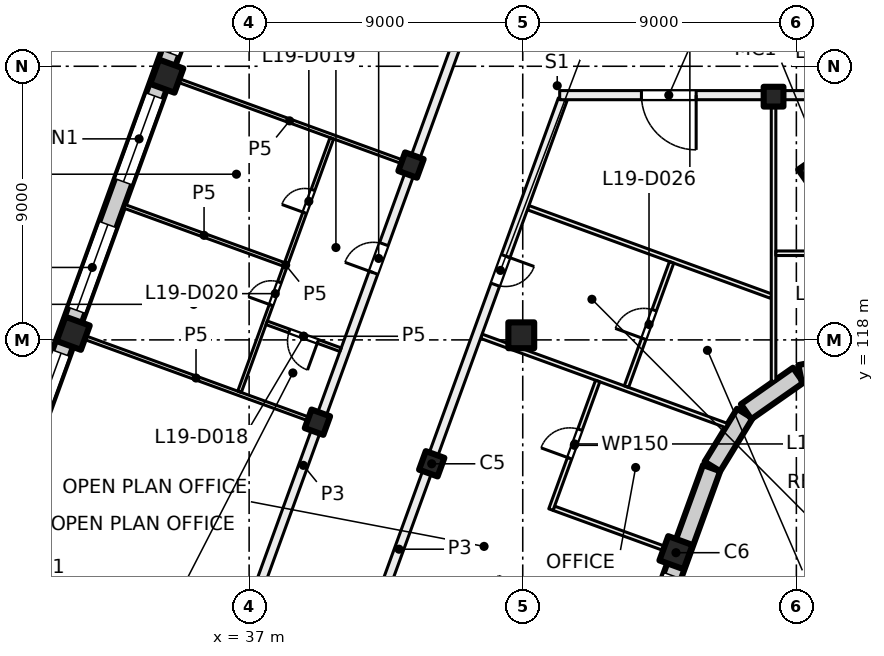
"""IFC4 building model, lengths in metres.
Left out: names, types, materials, properties, quantities, classifications, styles, units other than length and angle.
Written with IfcOpenShell. Run it as: python <this file> out.ifc"""

import sys

from ifc_helpers import new_model, si_unit, direction, frame, frame_2d, origin, origin_2d, place, context, subcontext, project, spatial, rectangle, hollow_rectangle, extrude, element, fill, save


model = new_model("IFC4")
c1 = context("Model", 3, precision=1e-05, world=origin(), true_north=direction((0.0, 1.0)))
c2 = subcontext(c1, "Body", "Model", "MODEL_VIEW")
j1 = project(units=[si_unit("LENGTHUNIT", "METRE"), si_unit("PLANEANGLEUNIT", "RADIAN")], contexts=[c1])
p1 = place(None, origin())
s1 = spatial("IfcSite", under=j1, at=p1, CompositionType="ELEMENT")
p2 = place(p1, origin())
s2 = spatial("IfcBuilding", under=s1, at=p2, CompositionType="ELEMENT")
p3 = place(p2, frame((0.0, 0.0, 85.0)))
s3 = spatial("IfcBuildingStorey", under=s2, at=p3, CompositionType="ELEMENT", Elevation=85.0)
p4 = place(p3, frame((56.036, 123.43, 0.0), z_axis=(0.0, 0.0, 1.0), x_axis=(0.573576436351, -0.819152044289, 0.0)))
e1 = element("IfcColumn", 1, at=p4, inside=s3, PredefinedType="COLUMN", context=c2, shape_type="SweptSolid", body=[
    extrude(hollow_rectangle(XDim=1.4, YDim=1.4, WallThickness=0.04, at=origin_2d()), origin(), (0.0, 0.0, 1.0), 4.0),
])
p5 = place(p3, frame((54.25, 126.0, 0.0), z_axis=(0.0, 0.0, 1.0), x_axis=(1.0, 0.0, 0.0)))
e2 = element("IfcColumn", 2, at=p5, inside=s3, PredefinedType="COLUMN", context=c2, shape_type="SweptSolid", body=[
    extrude(rectangle(XDim=0.65, YDim=0.65, at=origin_2d()), origin(), (0.0, 0.0, 1.0), 4.0),
])
p6 = place(p3, frame((45.952, 118.152, 0.0), z_axis=(0.0, 0.0, 1.0), x_axis=(1.0, 0.0, 0.0)))
e3 = element("IfcColumn", 3, at=p6, inside=s3, PredefinedType="COLUMN", context=c2, shape_type="SweptSolid", body=[
    extrude(rectangle(XDim=0.85, YDim=0.85, at=origin_2d()), origin(), (0.0, 0.0, 1.0), 4.0),
])
for number, where, z_axis, x_axis in (
    (4, (43.006, 113.925, 0.0), (0.0, 0.0, 1.0), (-0.342, -0.94, 0.0)),
    (5, (42.325, 123.751, 0.0), (0.0, 0.0, 1.0), (-0.342, -0.94, 0.0)),
    (6, (39.247, 115.293, 0.0), (0.0, 0.0, 1.0), (-0.342, -0.94, 0.0)),
):
    element("IfcColumn", number, at=place(p3, frame(where, z_axis=z_axis, x_axis=x_axis)), inside=s3, PredefinedType="COLUMN", context=c2, shape_type="SweptSolid", body=[
        extrude(rectangle(XDim=0.65, YDim=0.65, at=origin_2d()), origin(), (0.0, 0.0, 1.0), 4.0),
    ])
for number, where, z_axis, x_axis in (
    (7, (51.04, 111.001, 0.0), (0.0, 0.0, 1.0), (-0.342, -0.94, 0.0)),
    (8, (34.291, 126.675, 0.0), (0.0, 0.0, 1.0), (-0.342, -0.94, 0.0)),
    (9, (31.212, 118.218, 0.0), (0.0, 0.0, 1.0), (-0.342, -0.94, 0.0)),
):
    element("IfcColumn", number, at=place(p3, frame(where, z_axis=z_axis, x_axis=x_axis)), inside=s3, PredefinedType="COLUMN", context=c2, shape_type="SweptSolid", body=[
        extrude(rectangle(XDim=0.85, YDim=0.85, at=origin_2d()), origin(), (0.0, 0.0, 1.0), 4.0),
    ])
p7 = place(p3, frame((52.212, 113.783, 0.0), z_axis=(0.0, 0.0, 1.0), x_axis=(-0.34202521188, -0.939690775968, 0.0)))
e10 = element("IfcWall", 10, at=p7, inside=s3, PredefinedType="SOLIDWALL", context=c2, shape_type="SweptSolid", body=[
    extrude(rectangle(XDim=21.745, YDim=0.6, at=frame_2d((10.873, 0.0))), origin(), (0.0, 0.0, 1.0), 3.625),
])
p8 = place(p7, frame((3.765, 0.0, 0.9)))
e11 = element("IfcOpeningElement", 11, at=p8, cuts=e10, PredefinedType="OPENING", context=c2, shape_type="SweptSolid", body=[
    extrude(rectangle(XDim=3.0, YDim=2.4, at=frame_2d((1.5, 1.2))), frame((0.0, 0.31, 0.0), z_axis=(0.0, -1.0, 0.0), x_axis=(1.0, 0.0, 0.0)), (0.0, 0.0, 1.0), 0.62),
])
p9 = place(p7, frame((8.265, 0.0, 0.9)))
e12 = element("IfcOpeningElement", 12, at=p9, cuts=e10, PredefinedType="OPENING", context=c2, shape_type="SweptSolid", body=[
    extrude(rectangle(XDim=3.0, YDim=2.4, at=frame_2d((1.5, 1.2))), frame((0.0, 0.31, 0.0), z_axis=(0.0, -1.0, 0.0), x_axis=(1.0, 0.0, 0.0)), (0.0, 0.0, 1.0), 0.62),
])
p10 = place(p7, frame((12.765, 0.0, 0.9)))
e13 = element("IfcOpeningElement", 13, at=p10, cuts=e10, PredefinedType="OPENING", context=c2, shape_type="SweptSolid", body=[
    extrude(rectangle(XDim=3.0, YDim=2.4, at=frame_2d((1.5, 1.2))), frame((0.0, 0.31, 0.0), z_axis=(0.0, -1.0, 0.0), x_axis=(1.0, 0.0, 0.0)), (0.0, 0.0, 1.0), 0.62),
])
p11 = place(p7, frame((17.265, 0.0, 0.9)))
e14 = element("IfcOpeningElement", 14, at=p11, cuts=e10, PredefinedType="OPENING", context=c2, shape_type="SweptSolid", body=[
    extrude(rectangle(XDim=3.0, YDim=2.4, at=frame_2d((1.5, 1.2))), frame((0.0, 0.31, 0.0), z_axis=(0.0, -1.0, 0.0), x_axis=(1.0, 0.0, 0.0)), (0.0, 0.0, 1.0), 0.62),
])
p12 = place(p3, frame((53.305, 115.578, 0.0), z_axis=(0.0, 0.0, 1.0), x_axis=(-0.522402266438, -0.852699168535, 0.0)))
e15 = element("IfcWall", 15, at=p12, inside=s3, PredefinedType="SOLIDWALL", context=c2, shape_type="SweptSolid", body=[
    extrude(rectangle(XDim=2.042, YDim=0.6, at=frame_2d((1.021, 0.0))), origin(), (0.0, 0.0, 1.0), 3.625),
])
for number, where, z_axis, x_axis in (
    (16, (55.062, 116.839, 0.0), (0.0, 0.0, 1.0), (-0.819, -0.574, 0.0)),
    (17, (57.175, 117.294, 0.0), (0.0, 0.0, 1.0), (-0.98, -0.199, 0.0)),
):
    element("IfcWall", number, at=place(p3, frame(where, z_axis=z_axis, x_axis=x_axis)), inside=s3, PredefinedType="SOLIDWALL", context=c2, shape_type="SweptSolid", body=[
        extrude(rectangle(XDim=2.092, YDim=0.6, at=frame_2d((1.046, 0.0))), origin(), (0.0, 0.0, 1.0), 3.625),
    ])
p13 = place(p3, frame((24.666, 100.669, 0.0), z_axis=(0.0, 0.0, 1.0), x_axis=(0.34201964167, 0.939692803373, 0.0)))
e18 = element("IfcWall", 18, at=p13, inside=s3, PredefinedType="SOLIDWALL", context=c2, shape_type="SweptSolid", body=[
    extrude(rectangle(XDim=32.884, YDim=0.6, at=frame_2d((16.442, 0.0))), origin(), (0.0, 0.0, 1.0), 3.625),
])
p14 = place(p13, frame((1.48, 0.0, 0.9)))
e19 = element("IfcOpeningElement", 19, at=p14, cuts=e18, PredefinedType="OPENING", context=c2, shape_type="SweptSolid", body=[
    extrude(rectangle(XDim=3.0, YDim=2.4, at=frame_2d((1.5, 1.2))), frame((0.0, 0.31, 0.0), z_axis=(0.0, -1.0, 0.0), x_axis=(1.0, 0.0, 0.0)), (0.0, 0.0, 1.0), 0.62),
])
p15 = place(p13, frame((5.98, 0.0, 0.9)))
e20 = element("IfcOpeningElement", 20, at=p15, cuts=e18, PredefinedType="OPENING", context=c2, shape_type="SweptSolid", body=[
    extrude(rectangle(XDim=3.0, YDim=2.4, at=frame_2d((1.5, 1.2))), frame((0.0, 0.31, 0.0), z_axis=(0.0, -1.0, 0.0), x_axis=(1.0, 0.0, 0.0)), (0.0, 0.0, 1.0), 0.62),
])
p16 = place(p13, frame((10.48, 0.0, 0.9)))
e21 = element("IfcOpeningElement", 21, at=p16, cuts=e18, PredefinedType="OPENING", context=c2, shape_type="SweptSolid", body=[
    extrude(rectangle(XDim=3.0, YDim=2.4, at=frame_2d((1.5, 1.2))), frame((0.0, 0.31, 0.0), z_axis=(0.0, -1.0, 0.0), x_axis=(1.0, 0.0, 0.0)), (0.0, 0.0, 1.0), 0.62),
])
p17 = place(p13, frame((14.98, 0.0, 0.9)))
e22 = element("IfcOpeningElement", 22, at=p17, cuts=e18, PredefinedType="OPENING", context=c2, shape_type="SweptSolid", body=[
    extrude(rectangle(XDim=3.0, YDim=2.4, at=frame_2d((1.5, 1.2))), frame((0.0, 0.31, 0.0), z_axis=(0.0, -1.0, 0.0), x_axis=(1.0, 0.0, 0.0)), (0.0, 0.0, 1.0), 0.62),
])
p18 = place(p13, frame((19.48, 0.0, 0.9)))
e23 = element("IfcOpeningElement", 23, at=p18, cuts=e18, PredefinedType="OPENING", context=c2, shape_type="SweptSolid", body=[
    extrude(rectangle(XDim=3.0, YDim=2.4, at=frame_2d((1.5, 1.2))), frame((0.0, 0.31, 0.0), z_axis=(0.0, -1.0, 0.0), x_axis=(1.0, 0.0, 0.0)), (0.0, 0.0, 1.0), 0.62),
])
p19 = place(p13, frame((23.98, 0.0, 0.9)))
e24 = element("IfcOpeningElement", 24, at=p19, cuts=e18, PredefinedType="OPENING", context=c2, shape_type="SweptSolid", body=[
    extrude(rectangle(XDim=3.0, YDim=2.4, at=frame_2d((1.5, 1.2))), frame((0.0, 0.31, 0.0), z_axis=(0.0, -1.0, 0.0), x_axis=(1.0, 0.0, 0.0)), (0.0, 0.0, 1.0), 0.62),
])
p20 = place(p13, frame((28.48, 0.0, 0.9)))
e25 = element("IfcOpeningElement", 25, at=p20, cuts=e18, PredefinedType="OPENING", context=c2, shape_type="SweptSolid", body=[
    extrude(rectangle(XDim=3.0, YDim=2.4, at=frame_2d((1.5, 1.2))), frame((0.0, 0.31, 0.0), z_axis=(0.0, -1.0, 0.0), x_axis=(1.0, 0.0, 0.0)), (0.0, 0.0, 1.0), 0.62),
])
p21 = place(p3, frame((31.353, 118.166, 0.0), z_axis=(0.0, 0.0, 1.0), x_axis=(0.939687752599, -0.342033518263, 0.0)))
e26 = element("IfcWall", 26, at=p21, inside=s3, PredefinedType="PARTITIONING", context=c2, shape_type="SweptSolid", body=[
    extrude(rectangle(XDim=8.301, YDim=0.125, at=frame_2d((4.15, 0.0))), origin(), (0.0, 0.0, 1.0), 3.625),
])
p22 = place(p3, frame((32.881, 97.657, 0.0), z_axis=(0.0, 0.0, 1.0), x_axis=(0.342017360004, 0.939693633828, 0.0)))
e27 = element("IfcWall", 27, at=p22, inside=s3, PredefinedType="PARTITIONING", context=c2, shape_type="SweptSolid", body=[
    extrude(rectangle(XDim=34.516, YDim=0.3, at=frame_2d((17.258, 0.0))), origin(), (0.0, 0.0, 1.0), 3.625),
])
p23 = place(p22, frame((7.475, 0.0, 0.0)))
e28 = element("IfcOpeningElement", 28, at=p23, cuts=e27, PredefinedType="OPENING", context=c2, shape_type="SweptSolid", body=[
    extrude(rectangle(XDim=1.8, YDim=2.1, at=frame_2d((0.9, 1.05))), frame((0.0, 0.16, 0.0), z_axis=(0.0, -1.0, 0.0), x_axis=(1.0, 0.0, 0.0)), (0.0, 0.0, 1.0), 0.32),
])
p24 = place(p22, frame((24.0, 0.0, 0.0)))
e29 = element("IfcOpeningElement", 29, at=p24, cuts=e27, PredefinedType="OPENING", context=c2, shape_type="SweptSolid", body=[
    extrude(rectangle(XDim=1.0, YDim=2.1, at=frame_2d((0.5, 1.05))), frame((0.0, 0.16, 0.0), z_axis=(0.0, -1.0, 0.0), x_axis=(1.0, 0.0, 0.0)), (0.0, 0.0, 1.0), 0.32),
])
p25 = place(p3, frame((32.892, 122.395, 0.0), z_axis=(0.0, 0.0, 1.0), x_axis=(0.939696437289, -0.342009657388, 0.0)))
e30 = element("IfcWall", 30, at=p25, inside=s3, PredefinedType="PARTITIONING", context=c2, shape_type="SweptSolid", body=[
    extrude(rectangle(XDim=5.588, YDim=0.125, at=frame_2d((2.794, 0.0))), origin(), (0.0, 0.0, 1.0), 3.625),
])
p26 = place(p3, frame((34.431, 126.624, 0.0), z_axis=(0.0, 0.0, 1.0), x_axis=(0.939687752599, -0.342033518263, 0.0)))
e31 = element("IfcWall", 31, at=p26, inside=s3, PredefinedType="PARTITIONING", context=c2, shape_type="SweptSolid", body=[
    extrude(rectangle(XDim=8.301, YDim=0.125, at=frame_2d((4.15, 0.0))), origin(), (0.0, 0.0, 1.0), 3.625),
])
p27 = place(p3, frame((36.684, 116.293, 0.0), z_axis=(0.0, 0.0, 1.0), x_axis=(0.342089829483, 0.939667254173, 0.0)))
e32 = element("IfcWall", 32, at=p27, inside=s3, PredefinedType="PARTITIONING", context=c2, shape_type="SweptSolid", body=[
    extrude(rectangle(XDim=8.875, YDim=0.125, at=frame_2d((4.437, 0.0))), origin(), (0.0, 0.0, 1.0), 3.625),
])
p28 = place(p27, frame((6.266, 0.0, 0.0)))
e33 = element("IfcOpeningElement", 33, at=p28, cuts=e32, PredefinedType="OPENING", context=c2, shape_type="SweptSolid", body=[
    extrude(rectangle(XDim=0.8, YDim=2.1, at=frame_2d((0.4, 1.05))), frame((0.0, 0.073, 0.0), z_axis=(0.0, -1.0, 0.0), x_axis=(1.0, 0.0, 0.0)), (0.0, 0.0, 1.0), 0.145),
])
p29 = place(p27, frame((3.036, 0.0, 0.0)))
e34 = element("IfcOpeningElement", 34, at=p29, cuts=e32, PredefinedType="OPENING", context=c2, shape_type="SweptSolid", body=[
    extrude(rectangle(XDim=0.8, YDim=2.1, at=frame_2d((0.4, 1.05))), frame((0.0, 0.073, 0.0), z_axis=(0.0, -1.0, 0.0), x_axis=(1.0, 0.0, 0.0)), (0.0, 0.0, 1.0), 0.145),
])
p30 = place(p3, frame((40.008, 117.677, 0.0), z_axis=(0.0, 0.0, 1.0), x_axis=(-0.939674895655, 0.342068838798, 0.0)))
e35 = element("IfcWall", 35, at=p30, inside=s3, PredefinedType="PARTITIONING", context=c2, shape_type="SweptSolid", body=[
    extrude(rectangle(XDim=2.587, YDim=0.125, at=frame_2d((1.293, 0.0))), origin(), (0.0, 0.0, 1.0), 3.625),
])
p31 = place(p30, frame((0.793, 0.0, 0.0)))
e36 = element("IfcOpeningElement", 36, at=p31, cuts=e35, PredefinedType="OPENING", context=c2, shape_type="SweptSolid", body=[
    extrude(rectangle(XDim=1.0, YDim=2.1, at=frame_2d((0.5, 1.05))), frame((0.0, 0.073, 0.0), z_axis=(0.0, -1.0, 0.0), x_axis=(1.0, 0.0, 0.0)), (0.0, 0.0, 1.0), 0.145),
])
p32 = place(p3, frame((44.639, 118.12, 0.0), z_axis=(0.0, 0.0, 1.0), x_axis=(0.939669707102, -0.342083091593, 0.0)))
e37 = element("IfcWall", 37, at=p32, inside=s3, PredefinedType="PARTITIONING", context=c2, shape_type="SweptSolid", body=[
    extrude(rectangle(XDim=8.589, YDim=0.15, at=frame_2d((4.295, 0.0))), origin(), (0.0, 0.0, 1.0), 3.625),
])
p33 = place(p3, frame((46.178, 122.349, 0.0), z_axis=(0.0, 0.0, 1.0), x_axis=(0.939669476286, -0.342083725624, 0.0)))
e38 = element("IfcWall", 38, at=p33, inside=s3, PredefinedType="PARTITIONING", context=c2, shape_type="SweptSolid", body=[
    extrude(rectangle(XDim=8.516, YDim=0.15, at=frame_2d((4.258, 0.0))), origin(), (0.0, 0.0, 1.0), 3.625),
])
p34 = place(p3, frame((50.899, 111.052, 0.0), z_axis=(0.0, 0.0, 1.0), x_axis=(-0.93970873465, 0.341975867603, 0.0)))
e39 = element("IfcWall", 39, at=p34, inside=s3, PredefinedType="PARTITIONING", context=c2, shape_type="SweptSolid", body=[
    extrude(rectangle(XDim=4.126, YDim=0.15, at=frame_2d((2.063, 0.0))), origin(), (0.0, 0.0, 1.0), 3.625),
])
p35 = place(p3, frame((47.314, 125.909, 0.0), z_axis=(0.0, 0.0, 1.0), x_axis=(-0.342010770371, -0.939696032209, 0.0)))
e40 = element("IfcWall", 40, at=p35, inside=s3, PredefinedType="PARTITIONING", context=c2, shape_type="SweptSolid", body=[
    extrude(rectangle(XDim=31.485, YDim=0.3, at=frame_2d((15.742, 0.0))), origin(), (0.0, 0.0, 1.0), 3.625),
])
p36 = place(p35, frame((23.459, 0.0, 0.0)))
e41 = element("IfcOpeningElement", 41, at=p36, cuts=e40, PredefinedType="OPENING", context=c2, shape_type="SweptSolid", body=[
    extrude(rectangle(XDim=1.8, YDim=2.1, at=frame_2d((0.9, 1.05))), frame((0.0, 0.16, 0.0), z_axis=(0.0, -1.0, 0.0), x_axis=(1.0, 0.0, 0.0)), (0.0, 0.0, 1.0), 0.32),
])
p37 = place(p35, frame((5.484, 0.0, 0.0)))
e42 = element("IfcOpeningElement", 42, at=p37, cuts=e40, PredefinedType="OPENING", context=c2, shape_type="SweptSolid", body=[
    extrude(rectangle(XDim=1.0, YDim=2.1, at=frame_2d((0.5, 1.05))), frame((0.0, 0.16, 0.0), z_axis=(0.0, -1.0, 0.0), x_axis=(1.0, 0.0, 0.0)), (0.0, 0.0, 1.0), 0.32),
])
p38 = place(p3, frame((46.926, 112.419, 0.0), z_axis=(0.0, 0.0, 1.0), x_axis=(0.342056723843, 0.93967930576, 0.0)))
e43 = element("IfcWall", 43, at=p38, inside=s3, PredefinedType="PARTITIONING", context=c2, shape_type="SweptSolid", body=[
    extrude(rectangle(XDim=4.5, YDim=0.15, at=frame_2d((2.25, 0.0))), origin(), (0.0, 0.0, 1.0), 3.625),
])
p39 = place(p38, frame((1.797, 0.0, 0.0)))
e44 = element("IfcOpeningElement", 44, at=p39, cuts=e43, PredefinedType="OPENING", context=c2, shape_type="SweptSolid", body=[
    extrude(rectangle(XDim=1.0, YDim=2.1, at=frame_2d((0.5, 1.05))), frame((0.0, 0.085, 0.0), z_axis=(0.0, -1.0, 0.0), x_axis=(1.0, 0.0, 0.0)), (0.0, 0.0, 1.0), 0.17),
])
p40 = place(p3, frame((49.41, 116.463, 0.0), z_axis=(0.0, 0.0, 1.0), x_axis=(0.341837690029, 0.939759008297, 0.0)))
e45 = element("IfcWall", 45, at=p40, inside=s3, PredefinedType="PARTITIONING", context=c2, shape_type="SweptSolid", body=[
    extrude(rectangle(XDim=4.35, YDim=0.15, at=frame_2d((2.175, 0.0))), origin(), (0.0, 0.0, 1.0), 3.625),
])
p41 = place(p40, frame((1.675, 0.0, 0.0)))
e46 = element("IfcOpeningElement", 46, at=p41, cuts=e45, PredefinedType="OPENING", context=c2, shape_type="SweptSolid", body=[
    extrude(rectangle(XDim=1.0, YDim=2.1, at=frame_2d((0.5, 1.05))), frame((0.0, 0.085, 0.0), z_axis=(0.0, -1.0, 0.0), x_axis=(1.0, 0.0, 0.0)), (0.0, 0.0, 1.0), 0.17),
])
p42 = place(p3, frame((54.25, 116.637, 0.0), z_axis=(0.0, 0.0, 1.0), x_axis=(0.0, 1.0, 0.0)))
e47 = element("IfcWall", 47, at=p42, inside=s3, PredefinedType="PARTITIONING", context=c2, shape_type="SweptSolid", body=[
    extrude(rectangle(XDim=9.263, YDim=0.15, at=frame_2d((4.631, 0.0))), origin(), (0.0, 0.0, 1.0), 3.625),
])
p43 = place(p3, frame((54.325, 120.85, 0.0), z_axis=(0.0, 0.0, 1.0), x_axis=(1.0, 0.0, 0.0)))
e48 = element("IfcWall", 48, at=p43, inside=s3, PredefinedType="PARTITIONING", context=c2, shape_type="SweptSolid", body=[
    extrude(rectangle(XDim=4.35, YDim=0.15, at=frame_2d((2.175, 0.0))), origin(), (0.0, 0.0, 1.0), 3.625),
])
p44 = place(p43, frame((1.675, 0.0, 0.0)))
e49 = element("IfcOpeningElement", 49, at=p44, cuts=e48, PredefinedType="OPENING", context=c2, shape_type="SweptSolid", body=[
    extrude(rectangle(XDim=1.0, YDim=2.1, at=frame_2d((0.5, 1.05))), frame((0.0, 0.085, 0.0), z_axis=(0.0, -1.0, 0.0), x_axis=(1.0, 0.0, 0.0)), (0.0, 0.0, 1.0), 0.17),
])
p45 = place(p3, frame((91.0, 126.05, 0.0), z_axis=(0.0, 0.0, 1.0), x_axis=(-1.0, 0.0, 0.0)))
e50 = element("IfcWall", 50, at=p45, inside=s3, PredefinedType="PARTITIONING", context=c2, shape_type="SweptSolid", body=[
    extrude(rectangle(XDim=43.785, YDim=0.3, at=frame_2d((21.893, 0.0))), origin(), (0.0, 0.0, 1.0), 3.625),
])
p46 = place(p45, frame((7.475, 0.0, 0.0)))
e51 = element("IfcOpeningElement", 51, at=p46, cuts=e50, PredefinedType="OPENING", context=c2, shape_type="SweptSolid", body=[
    extrude(rectangle(XDim=1.8, YDim=2.1, at=frame_2d((0.9, 1.05))), frame((0.0, 0.16, 0.0), z_axis=(0.0, -1.0, 0.0), x_axis=(1.0, 0.0, 0.0)), (0.0, 0.0, 1.0), 0.32),
])
p47 = place(p45, frame((34.0, 0.0, 0.0)))
e52 = element("IfcOpeningElement", 52, at=p47, cuts=e50, PredefinedType="OPENING", context=c2, shape_type="SweptSolid", body=[
    extrude(rectangle(XDim=1.0, YDim=2.1, at=frame_2d((0.5, 1.05))), frame((0.0, 0.16, 0.0), z_axis=(0.0, -1.0, 0.0), x_axis=(1.0, 0.0, 0.0)), (0.0, 0.0, 1.0), 0.32),
])
p48 = place(p45, frame((39.296, 0.0, 0.0)))
e53 = element("IfcOpeningElement", 53, at=p48, cuts=e50, PredefinedType="OPENING", context=c2, shape_type="SweptSolid", body=[
    extrude(rectangle(XDim=1.8, YDim=2.1, at=frame_2d((0.9, 1.05))), frame((0.0, 0.16, 0.0), z_axis=(0.0, -1.0, 0.0), x_axis=(1.0, 0.0, 0.0)), (0.0, 0.0, 1.0), 0.32),
])
p49 = place(p8, origin())
e54 = element("IfcWindow", 54, at=p49, inside=s3, PartitioningType="SINGLE_PANEL", PredefinedType="WINDOW", context=c2, shape_type="SweptSolid", body=[
    extrude(rectangle(XDim=3.0, YDim=2.4, at=frame_2d((1.5, 1.2))), frame((0.0, 0.03, 0.0), z_axis=(0.0, -1.0, 0.0), x_axis=(1.0, 0.0, 0.0)), (0.0, 0.0, 1.0), 0.06),
])
fill(e11, e54)
p50 = place(p17, origin())
e55 = element("IfcWindow", 55, at=p50, inside=s3, PartitioningType="SINGLE_PANEL", PredefinedType="WINDOW", context=c2, shape_type="SweptSolid", body=[
    extrude(rectangle(XDim=3.0, YDim=2.4, at=frame_2d((1.5, 1.2))), frame((0.0, 0.03, 0.0), z_axis=(0.0, -1.0, 0.0), x_axis=(1.0, 0.0, 0.0)), (0.0, 0.0, 1.0), 0.06),
])
fill(e22, e55)
p51 = place(p18, origin())
e56 = element("IfcWindow", 56, at=p51, inside=s3, PartitioningType="SINGLE_PANEL", PredefinedType="WINDOW", context=c2, shape_type="SweptSolid", body=[
    extrude(rectangle(XDim=3.0, YDim=2.4, at=frame_2d((1.5, 1.2))), frame((0.0, 0.03, 0.0), z_axis=(0.0, -1.0, 0.0), x_axis=(1.0, 0.0, 0.0)), (0.0, 0.0, 1.0), 0.06),
])
fill(e23, e56)
p52 = place(p19, origin())
e57 = element("IfcWindow", 57, at=p52, inside=s3, PartitioningType="SINGLE_PANEL", PredefinedType="WINDOW", context=c2, shape_type="SweptSolid", body=[
    extrude(rectangle(XDim=3.0, YDim=2.4, at=frame_2d((1.5, 1.2))), frame((0.0, 0.03, 0.0), z_axis=(0.0, -1.0, 0.0), x_axis=(1.0, 0.0, 0.0)), (0.0, 0.0, 1.0), 0.06),
])
fill(e24, e57)
p53 = place(p20, origin())
e58 = element("IfcWindow", 58, at=p53, inside=s3, PartitioningType="SINGLE_PANEL", PredefinedType="WINDOW", context=c2, shape_type="SweptSolid", body=[
    extrude(rectangle(XDim=3.0, YDim=2.4, at=frame_2d((1.5, 1.2))), frame((0.0, 0.03, 0.0), z_axis=(0.0, -1.0, 0.0), x_axis=(1.0, 0.0, 0.0)), (0.0, 0.0, 1.0), 0.06),
])
fill(e25, e58)
p54 = place(p24, origin())
e59 = element("IfcDoor", 59, at=p54, inside=s3, OperationType="SINGLE_SWING_LEFT", PredefinedType="DOOR", context=c2, shape_type="SweptSolid", body=[
    extrude(rectangle(XDim=1.0, YDim=2.1, at=frame_2d((0.5, 1.05))), frame((0.0, 0.025, 0.0), z_axis=(0.0, -1.0, 0.0), x_axis=(1.0, 0.0, 0.0)), (0.0, 0.0, 1.0), 0.05),
])
fill(e29, e59)
p55 = place(p31, origin())
e60 = element("IfcDoor", 60, at=p55, inside=s3, OperationType="SINGLE_SWING_LEFT", PredefinedType="DOOR", context=c2, shape_type="SweptSolid", body=[
    extrude(rectangle(XDim=1.0, YDim=2.1, at=frame_2d((0.5, 1.05))), frame((0.0, 0.025, 0.0), z_axis=(0.0, -1.0, 0.0), x_axis=(1.0, 0.0, 0.0)), (0.0, 0.0, 1.0), 0.05),
])
fill(e36, e60)
p56 = place(p28, origin())
e61 = element("IfcDoor", 61, at=p56, inside=s3, OperationType="SINGLE_SWING_RIGHT", PredefinedType="DOOR", context=c2, shape_type="SweptSolid", body=[
    extrude(rectangle(XDim=0.8, YDim=2.1, at=frame_2d((0.4, 1.05))), frame((0.0, 0.025, 0.0), z_axis=(0.0, -1.0, 0.0), x_axis=(1.0, 0.0, 0.0)), (0.0, 0.0, 1.0), 0.05),
])
fill(e33, e61)
p57 = place(p29, origin())
e62 = element("IfcDoor", 62, at=p57, inside=s3, OperationType="SINGLE_SWING_LEFT", PredefinedType="DOOR", context=c2, shape_type="SweptSolid", body=[
    extrude(rectangle(XDim=0.8, YDim=2.1, at=frame_2d((0.4, 1.05))), frame((0.0, 0.025, 0.0), z_axis=(0.0, -1.0, 0.0), x_axis=(1.0, 0.0, 0.0)), (0.0, 0.0, 1.0), 0.05),
])
fill(e34, e62)
p58 = place(p37, origin())
e63 = element("IfcDoor", 63, at=p58, inside=s3, OperationType="SINGLE_SWING_LEFT", PredefinedType="DOOR", context=c2, shape_type="SweptSolid", body=[
    extrude(rectangle(XDim=1.0, YDim=2.1, at=frame_2d((0.5, 1.05))), frame((0.0, 0.025, 0.0), z_axis=(0.0, -1.0, 0.0), x_axis=(1.0, 0.0, 0.0)), (0.0, 0.0, 1.0), 0.05),
])
fill(e42, e63)
p59 = place(p39, origin())
e64 = element("IfcDoor", 64, at=p59, inside=s3, OperationType="SINGLE_SWING_RIGHT", PredefinedType="DOOR", context=c2, shape_type="SweptSolid", body=[
    extrude(rectangle(XDim=1.0, YDim=2.1, at=frame_2d((0.5, 1.05))), frame((0.0, 0.025, 0.0), z_axis=(0.0, -1.0, 0.0), x_axis=(1.0, 0.0, 0.0)), (0.0, 0.0, 1.0), 0.05),
])
fill(e44, e64)
p60 = place(p41, origin())
e65 = element("IfcDoor", 65, at=p60, inside=s3, OperationType="SINGLE_SWING_LEFT", PredefinedType="DOOR", context=c2, shape_type="SweptSolid", body=[
    extrude(rectangle(XDim=1.0, YDim=2.1, at=frame_2d((0.5, 1.05))), frame((0.0, 0.025, 0.0), z_axis=(0.0, -1.0, 0.0), x_axis=(1.0, 0.0, 0.0)), (0.0, 0.0, 1.0), 0.05),
])
fill(e46, e65)
p61 = place(p48, origin())
e66 = element("IfcDoor", 66, at=p61, inside=s3, OperationType="DOUBLE_DOOR_SINGLE_SWING", PredefinedType="DOOR", context=c2, shape_type="SweptSolid", body=[
    extrude(rectangle(XDim=1.8, YDim=2.1, at=frame_2d((0.9, 1.05))), frame((0.0, 0.025, 0.0), z_axis=(0.0, -1.0, 0.0), x_axis=(1.0, 0.0, 0.0)), (0.0, 0.0, 1.0), 0.05),
])
fill(e53, e66)
save(model, sys.argv[1])
